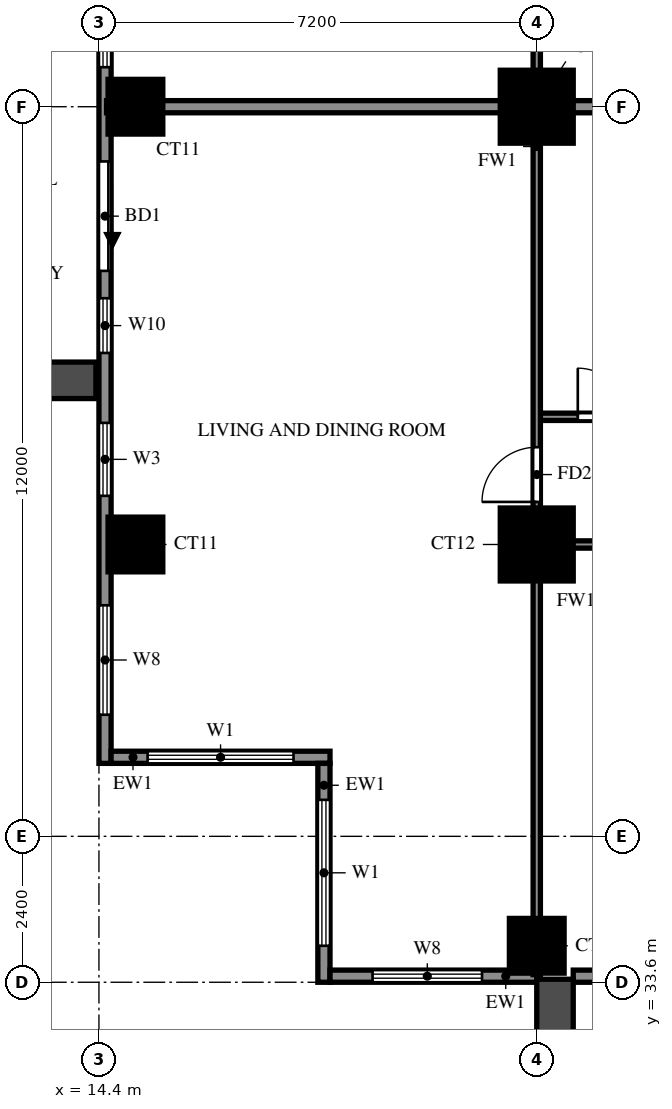
"""IFC4 building model, lengths in metres.
Left out: names, types, materials, properties, quantities, classifications, styles, units other than length and angle.
Written with IfcOpenShell. Run it as: python <this file> out.ifc"""

import sys

from ifc_helpers import new_model, si_unit, direction, frame, frame_2d, origin, origin_2d, place, context, subcontext, project, spatial, rectangle, extrude, source, transform, mapped, element, fill, save


model = new_model("IFC4")
c1 = context("Model", 3, precision=1e-05, world=origin(), true_north=direction((0.0, 1.0)))
c2 = subcontext(c1, "Body", "Model", "MODEL_VIEW")
j1 = project(units=[si_unit("LENGTHUNIT", "METRE"), si_unit("PLANEANGLEUNIT", "RADIAN")], contexts=[c1])
p1 = place(None, origin())
s1 = spatial("IfcSite", under=j1, at=p1, CompositionType="ELEMENT")
p2 = place(p1, origin())
s2 = spatial("IfcBuilding", under=s1, at=p2, CompositionType="ELEMENT")
p3 = place(p2, frame((0.0, 0.0, 93.5)))
s3 = spatial("IfcBuildingStorey", under=s2, at=p3, CompositionType="ELEMENT", Elevation=93.5)
m1 = source(origin(), c2, "Body", "SweptSolid", [
    extrude(rectangle(XDim=0.9, YDim=0.9, at=origin_2d()), origin(), (0.0, 0.0, 1.0), 3.18),
])
for number, where, z_axis, x_axis in (
    (1, (21.6, 34.2, 0.0), (0.0, 0.0, 1.0), (1.0, 0.0, 0.0)),
    (2, (15.0, 40.8, 0.0), (0.0, 0.0, 1.0), (1.0, 0.0, 0.0)),
):
    element("IfcColumn", number, at=place(p3, frame(where, z_axis=z_axis, x_axis=x_axis)), inside=s3, PredefinedType="COLUMN", context=c2, shape_type="MappedRepresentation", body=[
        mapped(m1, transform((0.0, 0.0, 0.0))),
    ])
m2 = source(origin(), c2, "Body", "SweptSolid", [
    extrude(rectangle(XDim=1.2, YDim=1.2, at=origin_2d()), origin(), (0.0, 0.0, 1.0), 3.18),
])
p4 = place(p3, frame((21.6, 40.8, 0.0), z_axis=(0.0, 0.0, 1.0), x_axis=(1.0, 0.0, 0.0)))
e3 = element("IfcColumn", 3, at=p4, inside=s3, PredefinedType="COLUMN", context=c2, shape_type="MappedRepresentation", body=[
    mapped(m2, transform((0.0, 0.0, 0.0))),
])
p5 = place(p3, frame((15.0, 48.0, 0.0), z_axis=(0.0, 0.0, 1.0), x_axis=(1.0, 0.0, 0.0)))
e4 = element("IfcColumn", 4, at=p5, inside=s3, PredefinedType="COLUMN", context=c2, shape_type="MappedRepresentation", body=[
    mapped(m1, transform((0.0, 0.0, 0.0))),
])
p6 = place(p3, frame((21.6, 48.0, 0.0), z_axis=(0.0, 0.0, 1.0), x_axis=(1.0, 0.0, 0.0)))
e5 = element("IfcColumn", 5, at=p6, inside=s3, PredefinedType="COLUMN", context=c2, shape_type="MappedRepresentation", body=[
    mapped(m2, transform((0.0, 0.0, 0.0))),
])
p7 = place(p3, frame((14.5, 76.6, 0.0), z_axis=(0.0, 0.0, 1.0), x_axis=(0.0, -1.0, 0.0)))
e6 = element("IfcWall", 6, at=p7, inside=s3, PredefinedType="SOLIDWALL", context=c2, shape_type="SweptSolid", body=[
    extrude(rectangle(XDim=39.4, YDim=0.2, at=frame_2d((19.7, 0.0))), origin(), (0.0, 0.0, 1.0), 3.18),
])
p8 = place(p7, frame((15.1, 0.0, 0.0)))
e7 = element("IfcOpeningElement", 7, at=p8, cuts=e6, PredefinedType="OPENING", context=c2, shape_type="SweptSolid", body=[
    extrude(rectangle(XDim=1.8, YDim=2.4, at=frame_2d((0.9, 1.2))), frame((0.0, 0.11, 0.0), z_axis=(0.0, -1.0, 0.0), x_axis=(1.0, 0.0, 0.0)), (0.0, 0.0, 1.0), 0.22),
])
p9 = place(p7, frame((29.5, 0.0, 0.0)))
e8 = element("IfcOpeningElement", 8, at=p9, cuts=e6, PredefinedType="OPENING", context=c2, shape_type="SweptSolid", body=[
    extrude(rectangle(XDim=1.8, YDim=2.4, at=frame_2d((0.9, 1.2))), frame((0.0, 0.11, 0.0), z_axis=(0.0, -1.0, 0.0), x_axis=(1.0, 0.0, 0.0)), (0.0, 0.0, 1.0), 0.22),
])
p10 = place(p7, frame((31.75, 0.0, 0.6)))
e9 = element("IfcOpeningElement", 9, at=p10, cuts=e6, PredefinedType="OPENING", context=c2, shape_type="SweptSolid", body=[
    extrude(rectangle(XDim=0.9, YDim=2.4, at=frame_2d((0.45, 1.2))), frame((0.0, 0.11, 0.0), z_axis=(0.0, -1.0, 0.0), x_axis=(1.0, 0.0, 0.0)), (0.0, 0.0, 1.0), 0.22),
])
p11 = place(p7, frame((33.8, 0.0, 0.6)))
e10 = element("IfcOpeningElement", 10, at=p11, cuts=e6, PredefinedType="OPENING", context=c2, shape_type="SweptSolid", body=[
    extrude(rectangle(XDim=1.2, YDim=2.4, at=frame_2d((0.6, 1.2))), frame((0.0, 0.11, 0.0), z_axis=(0.0, -1.0, 0.0), x_axis=(1.0, 0.0, 0.0)), (0.0, 0.0, 1.0), 0.22),
])
p12 = place(p7, frame((36.8, 0.0, 0.6)))
e11 = element("IfcOpeningElement", 11, at=p12, cuts=e6, PredefinedType="OPENING", context=c2, shape_type="SweptSolid", body=[
    extrude(rectangle(XDim=1.8, YDim=2.4, at=frame_2d((0.9, 1.2))), frame((0.0, 0.11, 0.0), z_axis=(0.0, -1.0, 0.0), x_axis=(1.0, 0.0, 0.0)), (0.0, 0.0, 1.0), 0.22),
])
p13 = place(p7, frame((22.8, 0.0, 0.6)))
e12 = element("IfcOpeningElement", 12, at=p13, cuts=e6, PredefinedType="OPENING", context=c2, shape_type="SweptSolid", body=[
    extrude(rectangle(XDim=2.4, YDim=2.4, at=frame_2d((1.2, 1.2))), frame((0.0, 0.11, 0.0), z_axis=(0.0, -1.0, 0.0), x_axis=(1.0, 0.0, 0.0)), (0.0, 0.0, 1.0), 0.22),
])
p14 = place(p7, frame((27.05, 0.0, 0.6)))
e13 = element("IfcOpeningElement", 13, at=p14, cuts=e6, PredefinedType="OPENING", context=c2, shape_type="SweptSolid", body=[
    extrude(rectangle(XDim=0.9, YDim=2.4, at=frame_2d((0.45, 1.2))), frame((0.0, 0.11, 0.0), z_axis=(0.0, -1.0, 0.0), x_axis=(1.0, 0.0, 0.0)), (0.0, 0.0, 1.0), 0.22),
])
p15 = place(p7, frame((19.1, 0.0, 0.6)))
e14 = element("IfcOpeningElement", 14, at=p15, cuts=e6, PredefinedType="OPENING", context=c2, shape_type="SweptSolid", body=[
    extrude(rectangle(XDim=1.8, YDim=2.4, at=frame_2d((0.9, 1.2))), frame((0.0, 0.11, 0.0), z_axis=(0.0, -1.0, 0.0), x_axis=(1.0, 0.0, 0.0)), (0.0, 0.0, 1.0), 0.22),
])
p16 = place(p7, frame((10.75, 0.0, 1.5)))
e15 = element("IfcOpeningElement", 15, at=p16, cuts=e6, PredefinedType="OPENING", context=c2, shape_type="SweptSolid", body=[
    extrude(rectangle(XDim=0.9, YDim=0.9, at=frame_2d((0.45, 0.45))), frame((0.0, 0.11, 0.0), z_axis=(0.0, -1.0, 0.0), x_axis=(1.0, 0.0, 0.0)), (0.0, 0.0, 1.0), 0.22),
])
p17 = place(p7, frame((12.65, 0.0, 1.5)))
e16 = element("IfcOpeningElement", 16, at=p17, cuts=e6, PredefinedType="OPENING", context=c2, shape_type="SweptSolid", body=[
    extrude(rectangle(XDim=0.9, YDim=0.9, at=frame_2d((0.45, 0.45))), frame((0.0, 0.11, 0.0), z_axis=(0.0, -1.0, 0.0), x_axis=(1.0, 0.0, 0.0)), (0.0, 0.0, 1.0), 0.22),
])
p18 = place(p7, frame((7.8, 0.0, 0.6)))
e17 = element("IfcOpeningElement", 17, at=p18, cuts=e6, PredefinedType="OPENING", context=c2, shape_type="SweptSolid", body=[
    extrude(rectangle(XDim=2.4, YDim=2.4, at=frame_2d((1.2, 1.2))), frame((0.0, 0.11, 0.0), z_axis=(0.0, -1.0, 0.0), x_axis=(1.0, 0.0, 0.0)), (0.0, 0.0, 1.0), 0.22),
])
p19 = place(p7, frame((3.8, 0.0, 0.6)))
e18 = element("IfcOpeningElement", 18, at=p19, cuts=e6, PredefinedType="OPENING", context=c2, shape_type="SweptSolid", body=[
    extrude(rectangle(XDim=2.4, YDim=2.4, at=frame_2d((1.2, 1.2))), frame((0.0, 0.11, 0.0), z_axis=(0.0, -1.0, 0.0), x_axis=(1.0, 0.0, 0.0)), (0.0, 0.0, 1.0), 0.22),
])
p20 = place(p7, frame((0.6, 0.0, 0.6)))
e19 = element("IfcOpeningElement", 19, at=p20, cuts=e6, PredefinedType="OPENING", context=c2, shape_type="SweptSolid", body=[
    extrude(rectangle(XDim=2.4, YDim=2.4, at=frame_2d((1.2, 1.2))), frame((0.0, 0.11, 0.0), z_axis=(0.0, -1.0, 0.0), x_axis=(1.0, 0.0, 0.0)), (0.0, 0.0, 1.0), 0.22),
])
p21 = place(p3, frame((14.6, 37.3, 0.0), z_axis=(0.0, 0.0, 1.0), x_axis=(1.0, 0.0, 0.0)))
e20 = element("IfcWall", 20, at=p21, inside=s3, PredefinedType="SOLIDWALL", context=c2, shape_type="SweptSolid", body=[
    extrude(rectangle(XDim=3.6, YDim=0.2, at=frame_2d((1.8, 0.0))), origin(), (0.0, 0.0, 1.0), 3.18),
])
p22 = place(p21, frame((0.6, 0.0, 0.6)))
e21 = element("IfcOpeningElement", 21, at=p22, cuts=e20, PredefinedType="OPENING", context=c2, shape_type="SweptSolid", body=[
    extrude(rectangle(XDim=2.4, YDim=2.4, at=frame_2d((1.2, 1.2))), frame((0.0, 0.11, 0.0), z_axis=(0.0, -1.0, 0.0), x_axis=(1.0, 0.0, 0.0)), (0.0, 0.0, 1.0), 0.22),
])
p23 = place(p3, frame((18.1, 37.2, 0.0), z_axis=(0.0, 0.0, 1.0), x_axis=(0.0, -1.0, 0.0)))
e22 = element("IfcWall", 22, at=p23, inside=s3, PredefinedType="SOLIDWALL", context=c2, shape_type="SweptSolid", body=[
    extrude(rectangle(XDim=3.6, YDim=0.2, at=frame_2d((1.8, 0.0))), origin(), (0.0, 0.0, 1.0), 3.18),
])
p24 = place(p23, frame((0.6, 0.0, 0.6)))
e23 = element("IfcOpeningElement", 23, at=p24, cuts=e22, PredefinedType="OPENING", context=c2, shape_type="SweptSolid", body=[
    extrude(rectangle(XDim=2.4, YDim=2.4, at=frame_2d((1.2, 1.2))), frame((0.0, 0.11, 0.0), z_axis=(0.0, -1.0, 0.0), x_axis=(1.0, 0.0, 0.0)), (0.0, 0.0, 1.0), 0.22),
])
p25 = place(p3, frame((18.2, 33.7, 0.0), z_axis=(0.0, 0.0, 1.0), x_axis=(1.0, 0.0, 0.0)))
e24 = element("IfcWall", 24, at=p25, inside=s3, PredefinedType="SOLIDWALL", context=c2, shape_type="SweptSolid", body=[
    extrude(rectangle(XDim=3.4, YDim=0.2, at=frame_2d((1.7, 0.0))), origin(), (0.0, 0.0, 1.0), 3.18),
])
p26 = place(p25, frame((0.7, 0.0, 0.6)))
e25 = element("IfcOpeningElement", 25, at=p26, cuts=e24, PredefinedType="OPENING", context=c2, shape_type="SweptSolid", body=[
    extrude(rectangle(XDim=1.8, YDim=2.4, at=frame_2d((0.9, 1.2))), frame((0.0, 0.11, 0.0), z_axis=(0.0, -1.0, 0.0), x_axis=(1.0, 0.0, 0.0)), (0.0, 0.0, 1.0), 0.22),
])
p27 = place(p3, frame((22.2, 33.7, 0.0), z_axis=(0.0, 0.0, 1.0), x_axis=(1.0, 0.0, 0.0)))
e26 = element("IfcWall", 26, at=p27, inside=s3, PredefinedType="SOLIDWALL", context=c2, shape_type="SweptSolid", body=[
    extrude(rectangle(XDim=6.0, YDim=0.2, at=frame_2d((3.0, 0.0))), origin(), (0.0, 0.0, 1.0), 3.18),
])
p28 = place(p27, frame((0.9, 0.0, 0.0)))
e27 = element("IfcOpeningElement", 27, at=p28, cuts=e26, PredefinedType="OPENING", context=c2, shape_type="SweptSolid", body=[
    extrude(rectangle(XDim=1.8, YDim=2.4, at=frame_2d((0.9, 1.2))), frame((0.0, 0.11, 0.0), z_axis=(0.0, -1.0, 0.0), x_axis=(1.0, 0.0, 0.0)), (0.0, 0.0, 1.0), 0.22),
])
p29 = place(p27, frame((3.95, 0.0, 1.5)))
e28 = element("IfcOpeningElement", 28, at=p29, cuts=e26, PredefinedType="OPENING", context=c2, shape_type="SweptSolid", body=[
    extrude(rectangle(XDim=0.9, YDim=0.9, at=frame_2d((0.45, 0.45))), frame((0.0, 0.11, 0.0), z_axis=(0.0, -1.0, 0.0), x_axis=(1.0, 0.0, 0.0)), (0.0, 0.0, 1.0), 0.22),
])
p30 = place(p3, frame((14.35, 43.5, 0.0), z_axis=(0.0, 0.0, 1.0), x_axis=(-1.0, 0.0, 0.0)))
e29 = element("IfcWall", 29, at=p30, inside=s3, PredefinedType="SOLIDWALL", context=c2, shape_type="SweptSolid", body=[
    extrude(rectangle(XDim=2.65, YDim=0.6, at=frame_2d((1.325, 0.0))), origin(), (0.0, 0.0, 1.0), 2.85),
])
p31 = place(p3, frame((21.9, 33.65, 0.0), z_axis=(0.0, 0.0, 1.0), x_axis=(0.0, -1.0, 0.0)))
e30 = element("IfcWall", 30, at=p31, inside=s3, PredefinedType="SOLIDWALL", context=c2, shape_type="SweptSolid", body=[
    extrude(rectangle(XDim=2.75, YDim=0.6, at=frame_2d((1.375, 0.0))), origin(), (0.0, 0.0, 1.0), 2.85),
])
p32 = place(p3, frame((14.525, 48.0, 0.0), z_axis=(0.0, 0.0, 1.0), x_axis=(1.0, 0.0, 0.0)))
e31 = element("IfcWall", 31, at=p32, inside=s3, PredefinedType="SOLIDWALL", context=c2, shape_type="SweptSolid", body=[
    extrude(rectangle(XDim=19.075, YDim=0.2, at=frame_2d((9.538, 0.0))), origin(), (0.0, 0.0, 1.0), 3.18),
])
p33 = place(p3, frame((21.6, 40.8, 0.0), z_axis=(0.0, 0.0, 1.0), x_axis=(1.0, 0.0, 0.0)))
e32 = element("IfcWall", 32, at=p33, inside=s3, PredefinedType="PARTITIONING", context=c2, shape_type="SweptSolid", body=[
    extrude(rectangle(XDim=3.6, YDim=0.12, at=frame_2d((1.8, 0.0))), origin(), (0.0, 0.0, 1.0), 3.18),
])
p34 = place(p33, frame((1.35, 0.0, 0.0)))
e33 = element("IfcOpeningElement", 33, at=p34, cuts=e32, PredefinedType="OPENING", context=c2, shape_type="SweptSolid", body=[
    extrude(rectangle(XDim=0.9, YDim=2.1, at=frame_2d((0.45, 1.05))), frame((0.0, 0.07, 0.0), z_axis=(0.0, -1.0, 0.0), x_axis=(1.0, 0.0, 0.0)), (0.0, 0.0, 1.0), 0.14),
])
p35 = place(p3, frame((21.6, 42.9, 0.0), z_axis=(0.0, 0.0, 1.0), x_axis=(1.0, 0.0, 0.0)))
e34 = element("IfcWall", 34, at=p35, inside=s3, PredefinedType="PARTITIONING", context=c2, shape_type="SweptSolid", body=[
    extrude(rectangle(XDim=12.0, YDim=0.12, at=frame_2d((6.0, 0.0))), origin(), (0.0, 0.0, 1.0), 3.18),
])
p36 = place(p35, frame((0.675, 0.0, 0.0)))
e35 = element("IfcOpeningElement", 35, at=p36, cuts=e34, PredefinedType="OPENING", context=c2, shape_type="SweptSolid", body=[
    extrude(rectangle(XDim=0.8, YDim=2.1, at=frame_2d((0.4, 1.05))), frame((0.0, 0.07, 0.0), z_axis=(0.0, -1.0, 0.0), x_axis=(1.0, 0.0, 0.0)), (0.0, 0.0, 1.0), 0.14),
])
p37 = place(p35, frame((4.0, 0.0, 0.0)))
e36 = element("IfcOpeningElement", 36, at=p37, cuts=e34, PredefinedType="OPENING", context=c2, shape_type="SweptSolid", body=[
    extrude(rectangle(XDim=0.9, YDim=2.1, at=frame_2d((0.45, 1.05))), frame((0.0, 0.07, 0.0), z_axis=(0.0, -1.0, 0.0), x_axis=(1.0, 0.0, 0.0)), (0.0, 0.0, 1.0), 0.14),
])
p38 = place(p35, frame((7.475, 0.0, 0.0)))
e37 = element("IfcOpeningElement", 37, at=p38, cuts=e34, PredefinedType="OPENING", context=c2, shape_type="SweptSolid", body=[
    extrude(rectangle(XDim=0.9, YDim=2.1, at=frame_2d((0.45, 1.05))), frame((0.0, 0.07, 0.0), z_axis=(0.0, -1.0, 0.0), x_axis=(1.0, 0.0, 0.0)), (0.0, 0.0, 1.0), 0.14),
])
p39 = place(p35, frame((10.1, 0.0, 0.0)))
e38 = element("IfcOpeningElement", 38, at=p39, cuts=e34, PredefinedType="OPENING", context=c2, shape_type="SweptSolid", body=[
    extrude(rectangle(XDim=0.9, YDim=2.1, at=frame_2d((0.45, 1.05))), frame((0.0, 0.07, 0.0), z_axis=(0.0, -1.0, 0.0), x_axis=(1.0, 0.0, 0.0)), (0.0, 0.0, 1.0), 0.14),
])
p40 = place(p3, frame((21.6, 33.725, 0.0), z_axis=(0.0, 0.0, 1.0), x_axis=(0.0, 1.0, 0.0)))
e39 = element("IfcWall", 39, at=p40, inside=s3, PredefinedType="PARTITIONING", context=c2, shape_type="SweptSolid", body=[
    extrude(rectangle(XDim=28.675, YDim=0.12, at=frame_2d((14.337, 0.0))), origin(), (0.0, 0.0, 1.0), 3.18),
])
p41 = place(p40, frame((7.775, 0.0, 0.0)))
e40 = element("IfcOpeningElement", 40, at=p41, cuts=e39, PredefinedType="OPENING", context=c2, shape_type="SweptSolid", body=[
    extrude(rectangle(XDim=0.9, YDim=2.1, at=frame_2d((0.45, 1.05))), frame((0.0, 0.07, 0.0), z_axis=(0.0, -1.0, 0.0), x_axis=(1.0, 0.0, 0.0)), (0.0, 0.0, 1.0), 0.14),
])
p42 = place(p40, frame((17.125, 0.0, 0.0)))
e41 = element("IfcOpeningElement", 41, at=p42, cuts=e39, PredefinedType="OPENING", context=c2, shape_type="SweptSolid", body=[
    extrude(rectangle(XDim=1.5, YDim=2.1, at=frame_2d((0.75, 1.05))), frame((0.0, 0.07, 0.0), z_axis=(0.0, -1.0, 0.0), x_axis=(1.0, 0.0, 0.0)), (0.0, 0.0, 1.0), 0.14),
])
p43 = place(p40, frame((22.825, 0.0, 0.0)))
e42 = element("IfcOpeningElement", 42, at=p43, cuts=e39, PredefinedType="OPENING", context=c2, shape_type="SweptSolid", body=[
    extrude(rectangle(XDim=0.9, YDim=2.1, at=frame_2d((0.45, 1.05))), frame((0.0, 0.07, 0.0), z_axis=(0.0, -1.0, 0.0), x_axis=(1.0, 0.0, 0.0)), (0.0, 0.0, 1.0), 0.14),
])
p44 = place(p40, frame((26.425, 0.0, 0.0)))
e43 = element("IfcOpeningElement", 43, at=p44, cuts=e39, PredefinedType="OPENING", context=c2, shape_type="SweptSolid", body=[
    extrude(rectangle(XDim=0.9, YDim=2.1, at=frame_2d((0.45, 1.05))), frame((0.0, 0.07, 0.0), z_axis=(0.0, -1.0, 0.0), x_axis=(1.0, 0.0, 0.0)), (0.0, 0.0, 1.0), 0.14),
])
p45 = place(p9, origin())
e44 = element("IfcDoor", 44, at=p45, inside=s3, OperationType="DOUBLE_DOOR_SLIDING", PredefinedType="DOOR", context=c2, shape_type="SweptSolid", body=[
    extrude(rectangle(XDim=1.8, YDim=2.4, at=frame_2d((0.9, 1.2))), frame((0.0, 0.025, 0.0), z_axis=(0.0, -1.0, 0.0), x_axis=(1.0, 0.0, 0.0)), (0.0, 0.0, 1.0), 0.05),
])
fill(e8, e44)
p46 = place(p10, origin())
e45 = element("IfcWindow", 45, at=p46, inside=s3, PartitioningType="SINGLE_PANEL", PredefinedType="WINDOW", context=c2, shape_type="SweptSolid", body=[
    extrude(rectangle(XDim=0.9, YDim=2.4, at=frame_2d((0.45, 1.2))), frame((0.0, 0.03, 0.0), z_axis=(0.0, -1.0, 0.0), x_axis=(1.0, 0.0, 0.0)), (0.0, 0.0, 1.0), 0.06),
])
fill(e9, e45)
p47 = place(p11, origin())
e46 = element("IfcWindow", 46, at=p47, inside=s3, PartitioningType="SINGLE_PANEL", PredefinedType="WINDOW", context=c2, shape_type="SweptSolid", body=[
    extrude(rectangle(XDim=1.2, YDim=2.4, at=frame_2d((0.6, 1.2))), frame((0.0, 0.03, 0.0), z_axis=(0.0, -1.0, 0.0), x_axis=(1.0, 0.0, 0.0)), (0.0, 0.0, 1.0), 0.06),
])
fill(e10, e46)
p48 = place(p12, origin())
e47 = element("IfcWindow", 47, at=p48, inside=s3, PartitioningType="DOUBLE_PANEL_VERTICAL", PredefinedType="WINDOW", context=c2, shape_type="SweptSolid", body=[
    extrude(rectangle(XDim=1.8, YDim=2.4, at=frame_2d((0.9, 1.2))), frame((0.0, 0.03, 0.0), z_axis=(0.0, -1.0, 0.0), x_axis=(1.0, 0.0, 0.0)), (0.0, 0.0, 1.0), 0.06),
])
fill(e11, e47)
p49 = place(p14, origin())
e48 = element("IfcWindow", 48, at=p49, inside=s3, PartitioningType="SINGLE_PANEL", PredefinedType="WINDOW", context=c2, shape_type="SweptSolid", body=[
    extrude(rectangle(XDim=0.9, YDim=2.4, at=frame_2d((0.45, 1.2))), frame((0.0, 0.03, 0.0), z_axis=(0.0, -1.0, 0.0), x_axis=(1.0, 0.0, 0.0)), (0.0, 0.0, 1.0), 0.06),
])
fill(e13, e48)
p50 = place(p22, origin())
e49 = element("IfcWindow", 49, at=p50, inside=s3, PartitioningType="DOUBLE_PANEL_VERTICAL", PredefinedType="WINDOW", context=c2, shape_type="SweptSolid", body=[
    extrude(rectangle(XDim=2.4, YDim=2.4, at=frame_2d((1.2, 1.2))), frame((0.0, 0.03, 0.0), z_axis=(0.0, -1.0, 0.0), x_axis=(1.0, 0.0, 0.0)), (0.0, 0.0, 1.0), 0.06),
])
fill(e21, e49)
p51 = place(p24, origin())
e50 = element("IfcWindow", 50, at=p51, inside=s3, PartitioningType="DOUBLE_PANEL_VERTICAL", PredefinedType="WINDOW", context=c2, shape_type="SweptSolid", body=[
    extrude(rectangle(XDim=2.4, YDim=2.4, at=frame_2d((1.2, 1.2))), frame((0.0, 0.03, 0.0), z_axis=(0.0, -1.0, 0.0), x_axis=(1.0, 0.0, 0.0)), (0.0, 0.0, 1.0), 0.06),
])
fill(e23, e50)
p52 = place(p26, origin())
e51 = element("IfcWindow", 51, at=p52, inside=s3, PartitioningType="DOUBLE_PANEL_VERTICAL", PredefinedType="WINDOW", context=c2, shape_type="SweptSolid", body=[
    extrude(rectangle(XDim=1.8, YDim=2.4, at=frame_2d((0.9, 1.2))), frame((0.0, 0.03, 0.0), z_axis=(0.0, -1.0, 0.0), x_axis=(1.0, 0.0, 0.0)), (0.0, 0.0, 1.0), 0.06),
])
fill(e25, e51)
p53 = place(p41, origin())
e52 = element("IfcDoor", 52, at=p53, inside=s3, OperationType="SINGLE_SWING_RIGHT", PredefinedType="DOOR", context=c2, shape_type="SweptSolid", body=[
    extrude(rectangle(XDim=0.9, YDim=2.1, at=frame_2d((0.45, 1.05))), frame((0.0, 0.025, 0.0), z_axis=(0.0, -1.0, 0.0), x_axis=(1.0, 0.0, 0.0)), (0.0, 0.0, 1.0), 0.05),
])
fill(e40, e52)
p54 = place(p36, origin())
e53 = element("IfcDoor", 53, at=p54, inside=s3, OperationType="SINGLE_SWING_LEFT", PredefinedType="DOOR", context=c2, shape_type="SweptSolid", body=[
    extrude(rectangle(XDim=0.8, YDim=2.1, at=frame_2d((0.4, 1.05))), frame((0.0, 0.025, 0.0), z_axis=(0.0, -1.0, 0.0), x_axis=(1.0, 0.0, 0.0)), (0.0, 0.0, 1.0), 0.05),
])
fill(e35, e53)
save(model, sys.argv[1])
